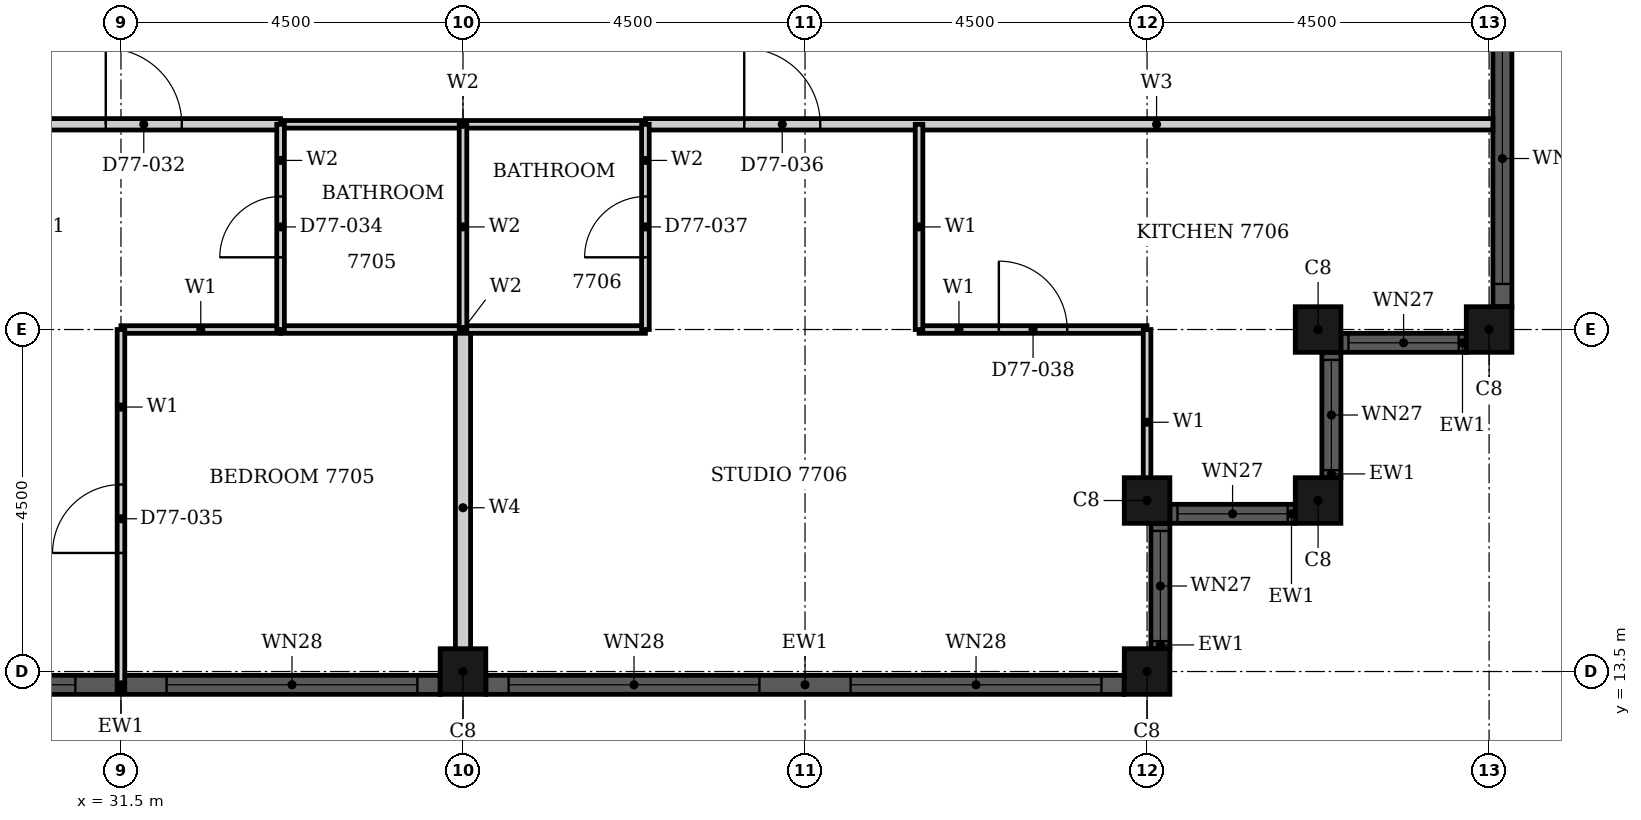
"""IFC4 building model, lengths in metres.
Left out: names, types, materials, properties, quantities, classifications, styles, units other than length and angle.
Written with IfcOpenShell. Run it as: python <this file> out.ifc"""

import sys

from ifc_helpers import new_model, si_unit, direction, frame, frame_2d, origin, origin_2d, place, context, subcontext, project, spatial, rectangle, hollow_rectangle, extrude, element, fill, save


model = new_model("IFC4")
c1 = context("Model", 3, precision=1e-05, world=origin(), true_north=direction((0.0, 1.0)))
c2 = subcontext(c1, "Body", "Model", "MODEL_VIEW")
j1 = project(units=[si_unit("LENGTHUNIT", "METRE"), si_unit("PLANEANGLEUNIT", "RADIAN")], contexts=[c1])
p1 = place(None, origin())
s1 = spatial("IfcSite", under=j1, at=p1, CompositionType="ELEMENT")
p2 = place(p1, origin())
s2 = spatial("IfcBuilding", under=s1, at=p2, CompositionType="ELEMENT")
p3 = place(p2, frame((0.0, 0.0, 301.9)))
s3 = spatial("IfcBuildingStorey", under=s2, at=p3, CompositionType="ELEMENT", Elevation=301.9)
for number, where, z_axis, x_axis in (
    (1, (45.0, 13.5, 0.0), (0.0, 0.0, 1.0), (1.0, 0.0, 0.0)),
    (2, (45.0, 15.75, 0.0), (0.0, 0.0, 1.0), (1.0, 0.0, 0.0)),
    (3, (47.25, 15.75, 0.0), (0.0, 0.0, 1.0), (1.0, 0.0, 0.0)),
    (4, (47.25, 18.0, 0.0), (0.0, 0.0, 1.0), (1.0, 0.0, 0.0)),
    (5, (49.5, 18.0, 0.0), (0.0, 0.0, 1.0), (1.0, 0.0, 0.0)),
    (6, (36.0, 13.5, 0.0), (0.0, 0.0, 1.0), (1.0, 0.0, 0.0)),
):
    element("IfcColumn", number, at=place(p3, frame(where, z_axis=z_axis, x_axis=x_axis)), inside=s3, PredefinedType="COLUMN", context=c2, shape_type="SweptSolid", body=[
        extrude(hollow_rectangle(XDim=0.6, YDim=0.6, WallThickness=0.02, at=origin_2d()), origin(), (0.0, 0.0, 1.0), 3.7),
    ])
p4 = place(p3, frame((45.175, 13.8, 0.0), z_axis=(0.0, 0.0, 1.0), x_axis=(0.0, 1.0, 0.0)))
e7 = element("IfcWall", 7, at=p4, inside=s3, PredefinedType="SOLIDWALL", context=c2, shape_type="SweptSolid", body=[
    extrude(rectangle(XDim=1.65, YDim=0.25, at=frame_2d((0.825, 0.0))), origin(), (0.0, 0.0, 1.0), 3.7),
])
p5 = place(p4, frame((0.1, 0.0, 0.9)))
e8 = element("IfcOpeningElement", 8, at=p5, cuts=e7, PredefinedType="OPENING", context=c2, shape_type="SweptSolid", body=[
    extrude(rectangle(XDim=1.45, YDim=1.35, at=frame_2d((0.725, 0.675))), frame((0.0, 0.135, 0.0), z_axis=(0.0, -1.0, 0.0), x_axis=(1.0, 0.0, 0.0)), (0.0, 0.0, 1.0), 0.27),
])
p6 = place(p3, frame((45.3, 15.575, 0.0), z_axis=(0.0, 0.0, 1.0), x_axis=(1.0, 0.0, 0.0)))
e9 = element("IfcWall", 9, at=p6, inside=s3, PredefinedType="SOLIDWALL", context=c2, shape_type="SweptSolid", body=[
    extrude(rectangle(XDim=1.65, YDim=0.25, at=frame_2d((0.825, 0.0))), origin(), (0.0, 0.0, 1.0), 3.7),
])
p7 = place(p6, frame((0.1, 0.0, 0.9)))
e10 = element("IfcOpeningElement", 10, at=p7, cuts=e9, PredefinedType="OPENING", context=c2, shape_type="SweptSolid", body=[
    extrude(rectangle(XDim=1.45, YDim=1.35, at=frame_2d((0.725, 0.675))), frame((0.0, 0.135, 0.0), z_axis=(0.0, -1.0, 0.0), x_axis=(1.0, 0.0, 0.0)), (0.0, 0.0, 1.0), 0.27),
])
p8 = place(p3, frame((47.425, 16.05, 0.0), z_axis=(0.0, 0.0, 1.0), x_axis=(0.0, 1.0, 0.0)))
e11 = element("IfcWall", 11, at=p8, inside=s3, PredefinedType="SOLIDWALL", context=c2, shape_type="SweptSolid", body=[
    extrude(rectangle(XDim=1.65, YDim=0.25, at=frame_2d((0.825, 0.0))), origin(), (0.0, 0.0, 1.0), 3.7),
])
p9 = place(p8, frame((0.1, 0.0, 0.9)))
e12 = element("IfcOpeningElement", 12, at=p9, cuts=e11, PredefinedType="OPENING", context=c2, shape_type="SweptSolid", body=[
    extrude(rectangle(XDim=1.45, YDim=1.35, at=frame_2d((0.725, 0.675))), frame((0.0, 0.135, 0.0), z_axis=(0.0, -1.0, 0.0), x_axis=(1.0, 0.0, 0.0)), (0.0, 0.0, 1.0), 0.27),
])
p10 = place(p3, frame((47.55, 17.825, 0.0), z_axis=(0.0, 0.0, 1.0), x_axis=(1.0, 0.0, 0.0)))
e13 = element("IfcWall", 13, at=p10, inside=s3, PredefinedType="SOLIDWALL", context=c2, shape_type="SweptSolid", body=[
    extrude(rectangle(XDim=1.65, YDim=0.25, at=frame_2d((0.825, 0.0))), origin(), (0.0, 0.0, 1.0), 3.7),
])
p11 = place(p10, frame((0.1, 0.0, 0.9)))
e14 = element("IfcOpeningElement", 14, at=p11, cuts=e13, PredefinedType="OPENING", context=c2, shape_type="SweptSolid", body=[
    extrude(rectangle(XDim=1.45, YDim=1.35, at=frame_2d((0.725, 0.675))), frame((0.0, 0.135, 0.0), z_axis=(0.0, -1.0, 0.0), x_axis=(1.0, 0.0, 0.0)), (0.0, 0.0, 1.0), 0.27),
])
p12 = place(p3, frame((49.675, 18.3, 0.0), z_axis=(0.0, 0.0, 1.0), x_axis=(0.0, 1.0, 0.0)))
e15 = element("IfcWall", 15, at=p12, inside=s3, PredefinedType="SOLIDWALL", context=c2, shape_type="SweptSolid", body=[
    extrude(rectangle(XDim=8.4, YDim=0.25, at=frame_2d((4.2, 0.0))), origin(), (0.0, 0.0, 1.0), 3.7),
])
p13 = place(p12, frame((0.3, 0.0, 0.45)))
e16 = element("IfcOpeningElement", 16, at=p13, cuts=e15, PredefinedType="OPENING", context=c2, shape_type="SweptSolid", body=[
    extrude(rectangle(XDim=3.3, YDim=1.8, at=frame_2d((1.65, 0.9))), frame((0.0, 0.135, 0.0), z_axis=(0.0, -1.0, 0.0), x_axis=(1.0, 0.0, 0.0)), (0.0, 0.0, 1.0), 0.27),
])
p14 = place(p12, frame((4.8, 0.0, 0.45)))
e17 = element("IfcOpeningElement", 17, at=p14, cuts=e15, PredefinedType="OPENING", context=c2, shape_type="SweptSolid", body=[
    extrude(rectangle(XDim=3.3, YDim=1.8, at=frame_2d((1.65, 0.9))), frame((0.0, 0.135, 0.0), z_axis=(0.0, -1.0, 0.0), x_axis=(1.0, 0.0, 0.0)), (0.0, 0.0, 1.0), 0.27),
])
p15 = place(p3, frame((27.3, 13.325, 0.0), z_axis=(0.0, 0.0, 1.0), x_axis=(1.0, 0.0, 0.0)))
e18 = element("IfcWall", 18, at=p15, inside=s3, PredefinedType="SOLIDWALL", context=c2, shape_type="SweptSolid", body=[
    extrude(rectangle(XDim=8.4, YDim=0.25, at=frame_2d((4.2, 0.0))), origin(), (0.0, 0.0, 1.0), 3.7),
])
p16 = place(p15, frame((0.3, 0.0, 0.45)))
e19 = element("IfcOpeningElement", 19, at=p16, cuts=e18, PredefinedType="OPENING", context=c2, shape_type="SweptSolid", body=[
    extrude(rectangle(XDim=3.3, YDim=1.8, at=frame_2d((1.65, 0.9))), frame((0.0, 0.135, 0.0), z_axis=(0.0, -1.0, 0.0), x_axis=(1.0, 0.0, 0.0)), (0.0, 0.0, 1.0), 0.27),
])
p17 = place(p15, frame((4.8, 0.0, 0.45)))
e20 = element("IfcOpeningElement", 20, at=p17, cuts=e18, PredefinedType="OPENING", context=c2, shape_type="SweptSolid", body=[
    extrude(rectangle(XDim=3.3, YDim=1.8, at=frame_2d((1.65, 0.9))), frame((0.0, 0.135, 0.0), z_axis=(0.0, -1.0, 0.0), x_axis=(1.0, 0.0, 0.0)), (0.0, 0.0, 1.0), 0.27),
])
p18 = place(p3, frame((36.3, 13.325, 0.0), z_axis=(0.0, 0.0, 1.0), x_axis=(1.0, 0.0, 0.0)))
e21 = element("IfcWall", 21, at=p18, inside=s3, PredefinedType="SOLIDWALL", context=c2, shape_type="SweptSolid", body=[
    extrude(rectangle(XDim=8.4, YDim=0.25, at=frame_2d((4.2, 0.0))), origin(), (0.0, 0.0, 1.0), 3.7),
])
p19 = place(p18, frame((0.3, 0.0, 0.45)))
e22 = element("IfcOpeningElement", 22, at=p19, cuts=e21, PredefinedType="OPENING", context=c2, shape_type="SweptSolid", body=[
    extrude(rectangle(XDim=3.3, YDim=1.8, at=frame_2d((1.65, 0.9))), frame((0.0, 0.135, 0.0), z_axis=(0.0, -1.0, 0.0), x_axis=(1.0, 0.0, 0.0)), (0.0, 0.0, 1.0), 0.27),
])
p20 = place(p18, frame((4.8, 0.0, 0.45)))
e23 = element("IfcOpeningElement", 23, at=p20, cuts=e21, PredefinedType="OPENING", context=c2, shape_type="SweptSolid", body=[
    extrude(rectangle(XDim=3.3, YDim=1.8, at=frame_2d((1.65, 0.9))), frame((0.0, 0.135, 0.0), z_axis=(0.0, -1.0, 0.0), x_axis=(1.0, 0.0, 0.0)), (0.0, 0.0, 1.0), 0.27),
])
p21 = place(p3, frame((20.4, 20.7, 0.0), z_axis=(0.0, 0.0, 1.0), x_axis=(1.0, 0.0, 0.0)))
e24 = element("IfcWall", 24, at=p21, inside=s3, PredefinedType="PARTITIONING", context=c2, shape_type="SweptSolid", body=[
    extrude(rectangle(XDim=13.2, YDim=0.15, at=frame_2d((6.6, 0.0))), origin(), (0.0, 0.0, 1.0), 3.2),
])
p22 = place(p21, frame((1.3, 0.0, 0.0)))
e25 = element("IfcOpeningElement", 25, at=p22, cuts=e24, PredefinedType="OPENING", context=c2, shape_type="SweptSolid", body=[
    extrude(rectangle(XDim=1.0, YDim=2.2, at=frame_2d((0.5, 1.1))), frame((0.0, 0.085, 0.0), z_axis=(0.0, -1.0, 0.0), x_axis=(1.0, 0.0, 0.0)), (0.0, 0.0, 1.0), 0.17),
])
p23 = place(p21, frame((10.9, 0.0, 0.0)))
e26 = element("IfcOpeningElement", 26, at=p23, cuts=e24, PredefinedType="OPENING", context=c2, shape_type="SweptSolid", body=[
    extrude(rectangle(XDim=1.0, YDim=2.2, at=frame_2d((0.5, 1.1))), frame((0.0, 0.085, 0.0), z_axis=(0.0, -1.0, 0.0), x_axis=(1.0, 0.0, 0.0)), (0.0, 0.0, 1.0), 0.17),
])
p24 = place(p3, frame((38.4, 20.7, 0.0), z_axis=(0.0, 0.0, 1.0), x_axis=(1.0, 0.0, 0.0)))
e27 = element("IfcWall", 27, at=p24, inside=s3, PredefinedType="PARTITIONING", context=c2, shape_type="SweptSolid", body=[
    extrude(rectangle(XDim=11.15, YDim=0.15, at=frame_2d((5.575, 0.0))), origin(), (0.0, 0.0, 1.0), 3.2),
])
p25 = place(p24, frame((1.3, 0.0, 0.0)))
e28 = element("IfcOpeningElement", 28, at=p25, cuts=e27, PredefinedType="OPENING", context=c2, shape_type="SweptSolid", body=[
    extrude(rectangle(XDim=1.0, YDim=2.2, at=frame_2d((0.5, 1.1))), frame((0.0, 0.085, 0.0), z_axis=(0.0, -1.0, 0.0), x_axis=(1.0, 0.0, 0.0)), (0.0, 0.0, 1.0), 0.17),
])
p26 = place(p3, frame((31.5, 18.0, 0.0), z_axis=(0.0, 0.0, 1.0), x_axis=(1.0, 0.0, 0.0)))
e29 = element("IfcWall", 29, at=p26, inside=s3, PredefinedType="PARTITIONING", context=c2, shape_type="SweptSolid", body=[
    extrude(rectangle(XDim=2.1, YDim=0.1, at=frame_2d((1.05, 0.0))), origin(), (0.0, 0.0, 1.0), 3.2),
])
p27 = place(p3, frame((42.0, 18.0, 0.0), z_axis=(0.0, 0.0, 1.0), x_axis=(1.0, 0.0, 0.0)))
e30 = element("IfcWall", 30, at=p27, inside=s3, PredefinedType="PARTITIONING", context=c2, shape_type="SweptSolid", body=[
    extrude(rectangle(XDim=3.0, YDim=0.1, at=frame_2d((1.5, 0.0))), origin(), (0.0, 0.0, 1.0), 3.2),
])
p28 = place(p27, frame((1.05, 0.0, 0.0)))
e31 = element("IfcOpeningElement", 31, at=p28, cuts=e30, PredefinedType="OPENING", context=c2, shape_type="SweptSolid", body=[
    extrude(rectangle(XDim=0.9, YDim=2.1, at=frame_2d((0.45, 1.05))), frame((0.0, 0.06, 0.0), z_axis=(0.0, -1.0, 0.0), x_axis=(1.0, 0.0, 0.0)), (0.0, 0.0, 1.0), 0.12),
])
p29 = place(p3, frame((31.5, 13.26, 0.0), z_axis=(0.0, 0.0, 1.0), x_axis=(0.0, 1.0, 0.0)))
e32 = element("IfcWall", 32, at=p29, inside=s3, PredefinedType="PARTITIONING", context=c2, shape_type="SweptSolid", body=[
    extrude(rectangle(XDim=4.74, YDim=0.1, at=frame_2d((2.37, 0.0))), origin(), (0.0, 0.0, 1.0), 3.2),
])
p30 = place(p29, frame((1.8, 0.0, 0.0)))
e33 = element("IfcOpeningElement", 33, at=p30, cuts=e32, PredefinedType="OPENING", context=c2, shape_type="SweptSolid", body=[
    extrude(rectangle(XDim=0.9, YDim=2.1, at=frame_2d((0.45, 1.05))), frame((0.0, 0.06, 0.0), z_axis=(0.0, -1.0, 0.0), x_axis=(1.0, 0.0, 0.0)), (0.0, 0.0, 1.0), 0.12),
])
p31 = place(p3, frame((42.0, 18.0, 0.0), z_axis=(0.0, 0.0, 1.0), x_axis=(0.0, 1.0, 0.0)))
e34 = element("IfcWall", 34, at=p31, inside=s3, PredefinedType="PARTITIONING", context=c2, shape_type="SweptSolid", body=[
    extrude(rectangle(XDim=2.7, YDim=0.1, at=frame_2d((1.35, 0.0))), origin(), (0.0, 0.0, 1.0), 3.2),
])
p32 = place(p3, frame((45.0, 15.56, 0.0), z_axis=(0.0, 0.0, 1.0), x_axis=(0.0, 1.0, 0.0)))
e35 = element("IfcWall", 35, at=p32, inside=s3, PredefinedType="PARTITIONING", context=c2, shape_type="SweptSolid", body=[
    extrude(rectangle(XDim=2.44, YDim=0.1, at=frame_2d((1.22, 0.0))), origin(), (0.0, 0.0, 1.0), 3.2),
])
p33 = place(p3, frame((36.0, 13.31, 0.0), z_axis=(0.0, 0.0, 1.0), x_axis=(0.0, 1.0, 0.0)))
e36 = element("IfcWall", 36, at=p33, inside=s3, PredefinedType="PARTITIONING", context=c2, shape_type="SweptSolid", body=[
    extrude(rectangle(XDim=4.69, YDim=0.2, at=frame_2d((2.345, 0.0))), origin(), (0.0, 0.0, 1.0), 3.2),
])
for number, where, z_axis, x_axis in (
    (37, (33.6, 18.0, 0.0), (0.0, 0.0, 1.0), (1.0, 0.0, 0.0)),
    (38, (33.6, 20.7, 0.0), (0.0, 0.0, 1.0), (1.0, 0.0, 0.0)),
):
    element("IfcWall", number, at=place(p3, frame(where, z_axis=z_axis, x_axis=x_axis)), inside=s3, PredefinedType="PARTITIONING", context=c2, shape_type="SweptSolid", body=[
        extrude(rectangle(XDim=4.8, YDim=0.1, at=frame_2d((2.4, 0.0))), origin(), (0.0, 0.0, 1.0), 3.2),
    ])
p34 = place(p3, frame((33.6, 18.0, 0.0), z_axis=(0.0, 0.0, 1.0), x_axis=(0.0, 1.0, 0.0)))
e39 = element("IfcWall", 39, at=p34, inside=s3, PredefinedType="PARTITIONING", context=c2, shape_type="SweptSolid", body=[
    extrude(rectangle(XDim=2.7, YDim=0.1, at=frame_2d((1.35, 0.0))), origin(), (0.0, 0.0, 1.0), 3.2),
])
p35 = place(p34, frame((0.95, 0.0, 0.0)))
e40 = element("IfcOpeningElement", 40, at=p35, cuts=e39, PredefinedType="OPENING", context=c2, shape_type="SweptSolid", body=[
    extrude(rectangle(XDim=0.8, YDim=2.1, at=frame_2d((0.4, 1.05))), frame((0.0, 0.06, 0.0), z_axis=(0.0, -1.0, 0.0), x_axis=(1.0, 0.0, 0.0)), (0.0, 0.0, 1.0), 0.12),
])
p36 = place(p3, frame((36.0, 18.0, 0.0), z_axis=(0.0, 0.0, 1.0), x_axis=(0.0, 1.0, 0.0)))
e41 = element("IfcWall", 41, at=p36, inside=s3, PredefinedType="PARTITIONING", context=c2, shape_type="SweptSolid", body=[
    extrude(rectangle(XDim=2.7, YDim=0.1, at=frame_2d((1.35, 0.0))), origin(), (0.0, 0.0, 1.0), 3.2),
])
p37 = place(p3, frame((38.4, 18.0, 0.0), z_axis=(0.0, 0.0, 1.0), x_axis=(0.0, 1.0, 0.0)))
e42 = element("IfcWall", 42, at=p37, inside=s3, PredefinedType="PARTITIONING", context=c2, shape_type="SweptSolid", body=[
    extrude(rectangle(XDim=2.7, YDim=0.1, at=frame_2d((1.35, 0.0))), origin(), (0.0, 0.0, 1.0), 3.2),
])
p38 = place(p37, frame((0.95, 0.0, 0.0)))
e43 = element("IfcOpeningElement", 43, at=p38, cuts=e42, PredefinedType="OPENING", context=c2, shape_type="SweptSolid", body=[
    extrude(rectangle(XDim=0.8, YDim=2.1, at=frame_2d((0.4, 1.05))), frame((0.0, 0.06, 0.0), z_axis=(0.0, -1.0, 0.0), x_axis=(1.0, 0.0, 0.0)), (0.0, 0.0, 1.0), 0.12),
])
p39 = place(p5, origin())
e44 = element("IfcWindow", 44, at=p39, inside=s3, PartitioningType="SINGLE_PANEL", PredefinedType="WINDOW", context=c2, shape_type="SweptSolid", body=[
    extrude(rectangle(XDim=1.45, YDim=1.35, at=frame_2d((0.725, 0.675))), frame((0.0, 0.03, 0.0), z_axis=(0.0, -1.0, 0.0), x_axis=(1.0, 0.0, 0.0)), (0.0, 0.0, 1.0), 0.06),
])
fill(e8, e44)
p40 = place(p7, origin())
e45 = element("IfcWindow", 45, at=p40, inside=s3, PartitioningType="SINGLE_PANEL", PredefinedType="WINDOW", context=c2, shape_type="SweptSolid", body=[
    extrude(rectangle(XDim=1.45, YDim=1.35, at=frame_2d((0.725, 0.675))), frame((0.0, 0.03, 0.0), z_axis=(0.0, -1.0, 0.0), x_axis=(1.0, 0.0, 0.0)), (0.0, 0.0, 1.0), 0.06),
])
fill(e10, e45)
p41 = place(p9, origin())
e46 = element("IfcWindow", 46, at=p41, inside=s3, PartitioningType="SINGLE_PANEL", PredefinedType="WINDOW", context=c2, shape_type="SweptSolid", body=[
    extrude(rectangle(XDim=1.45, YDim=1.35, at=frame_2d((0.725, 0.675))), frame((0.0, 0.03, 0.0), z_axis=(0.0, -1.0, 0.0), x_axis=(1.0, 0.0, 0.0)), (0.0, 0.0, 1.0), 0.06),
])
fill(e12, e46)
p42 = place(p11, origin())
e47 = element("IfcWindow", 47, at=p42, inside=s3, PartitioningType="SINGLE_PANEL", PredefinedType="WINDOW", context=c2, shape_type="SweptSolid", body=[
    extrude(rectangle(XDim=1.45, YDim=1.35, at=frame_2d((0.725, 0.675))), frame((0.0, 0.03, 0.0), z_axis=(0.0, -1.0, 0.0), x_axis=(1.0, 0.0, 0.0)), (0.0, 0.0, 1.0), 0.06),
])
fill(e14, e47)
p43 = place(p13, origin())
e48 = element("IfcWindow", 48, at=p43, inside=s3, PartitioningType="SINGLE_PANEL", PredefinedType="WINDOW", context=c2, shape_type="SweptSolid", body=[
    extrude(rectangle(XDim=3.3, YDim=1.8, at=frame_2d((1.65, 0.9))), frame((0.0, 0.03, 0.0), z_axis=(0.0, -1.0, 0.0), x_axis=(1.0, 0.0, 0.0)), (0.0, 0.0, 1.0), 0.06),
])
fill(e16, e48)
p44 = place(p16, origin())
e49 = element("IfcWindow", 49, at=p44, inside=s3, PartitioningType="SINGLE_PANEL", PredefinedType="WINDOW", context=c2, shape_type="SweptSolid", body=[
    extrude(rectangle(XDim=3.3, YDim=1.8, at=frame_2d((1.65, 0.9))), frame((0.0, 0.03, 0.0), z_axis=(0.0, -1.0, 0.0), x_axis=(1.0, 0.0, 0.0)), (0.0, 0.0, 1.0), 0.06),
])
fill(e19, e49)
p45 = place(p17, origin())
e50 = element("IfcWindow", 50, at=p45, inside=s3, PartitioningType="SINGLE_PANEL", PredefinedType="WINDOW", context=c2, shape_type="SweptSolid", body=[
    extrude(rectangle(XDim=3.3, YDim=1.8, at=frame_2d((1.65, 0.9))), frame((0.0, 0.03, 0.0), z_axis=(0.0, -1.0, 0.0), x_axis=(1.0, 0.0, 0.0)), (0.0, 0.0, 1.0), 0.06),
])
fill(e20, e50)
p46 = place(p19, origin())
e51 = element("IfcWindow", 51, at=p46, inside=s3, PartitioningType="SINGLE_PANEL", PredefinedType="WINDOW", context=c2, shape_type="SweptSolid", body=[
    extrude(rectangle(XDim=3.3, YDim=1.8, at=frame_2d((1.65, 0.9))), frame((0.0, 0.03, 0.0), z_axis=(0.0, -1.0, 0.0), x_axis=(1.0, 0.0, 0.0)), (0.0, 0.0, 1.0), 0.06),
])
fill(e22, e51)
p47 = place(p20, origin())
e52 = element("IfcWindow", 52, at=p47, inside=s3, PartitioningType="SINGLE_PANEL", PredefinedType="WINDOW", context=c2, shape_type="SweptSolid", body=[
    extrude(rectangle(XDim=3.3, YDim=1.8, at=frame_2d((1.65, 0.9))), frame((0.0, 0.03, 0.0), z_axis=(0.0, -1.0, 0.0), x_axis=(1.0, 0.0, 0.0)), (0.0, 0.0, 1.0), 0.06),
])
fill(e23, e52)
p48 = place(p23, origin())
e53 = element("IfcDoor", 53, at=p48, inside=s3, OperationType="SINGLE_SWING_RIGHT", PredefinedType="DOOR", context=c2, shape_type="SweptSolid", body=[
    extrude(rectangle(XDim=1.0, YDim=2.2, at=frame_2d((0.5, 1.1))), frame((0.0, 0.025, 0.0), z_axis=(0.0, -1.0, 0.0), x_axis=(1.0, 0.0, 0.0)), (0.0, 0.0, 1.0), 0.05),
])
fill(e26, e53)
p49 = place(p35, origin())
e54 = element("IfcDoor", 54, at=p49, inside=s3, OperationType="SINGLE_SWING_RIGHT", PredefinedType="DOOR", context=c2, shape_type="SweptSolid", body=[
    extrude(rectangle(XDim=0.8, YDim=2.1, at=frame_2d((0.4, 1.05))), frame((0.0, 0.025, 0.0), z_axis=(0.0, -1.0, 0.0), x_axis=(1.0, 0.0, 0.0)), (0.0, 0.0, 1.0), 0.05),
])
fill(e40, e54)
p50 = place(p30, origin())
e55 = element("IfcDoor", 55, at=p50, inside=s3, OperationType="SINGLE_SWING_LEFT", PredefinedType="DOOR", context=c2, shape_type="SweptSolid", body=[
    extrude(rectangle(XDim=0.9, YDim=2.1, at=frame_2d((0.45, 1.05))), frame((0.0, 0.025, 0.0), z_axis=(0.0, -1.0, 0.0), x_axis=(1.0, 0.0, 0.0)), (0.0, 0.0, 1.0), 0.05),
])
fill(e33, e55)
p51 = place(p25, origin())
e56 = element("IfcDoor", 56, at=p51, inside=s3, OperationType="SINGLE_SWING_RIGHT", PredefinedType="DOOR", context=c2, shape_type="SweptSolid", body=[
    extrude(rectangle(XDim=1.0, YDim=2.2, at=frame_2d((0.5, 1.1))), frame((0.0, 0.025, 0.0), z_axis=(0.0, -1.0, 0.0), x_axis=(1.0, 0.0, 0.0)), (0.0, 0.0, 1.0), 0.05),
])
fill(e28, e56)
p52 = place(p38, origin())
e57 = element("IfcDoor", 57, at=p52, inside=s3, OperationType="SINGLE_SWING_RIGHT", PredefinedType="DOOR", context=c2, shape_type="SweptSolid", body=[
    extrude(rectangle(XDim=0.8, YDim=2.1, at=frame_2d((0.4, 1.05))), frame((0.0, 0.025, 0.0), z_axis=(0.0, -1.0, 0.0), x_axis=(1.0, 0.0, 0.0)), (0.0, 0.0, 1.0), 0.05),
])
fill(e43, e57)
p53 = place(p28, origin())
e58 = element("IfcDoor", 58, at=p53, inside=s3, OperationType="SINGLE_SWING_LEFT", PredefinedType="DOOR", context=c2, shape_type="SweptSolid", body=[
    extrude(rectangle(XDim=0.9, YDim=2.1, at=frame_2d((0.45, 1.05))), frame((0.0, 0.025, 0.0), z_axis=(0.0, -1.0, 0.0), x_axis=(1.0, 0.0, 0.0)), (0.0, 0.0, 1.0), 0.05),
])
fill(e31, e58)
save(model, sys.argv[1])
